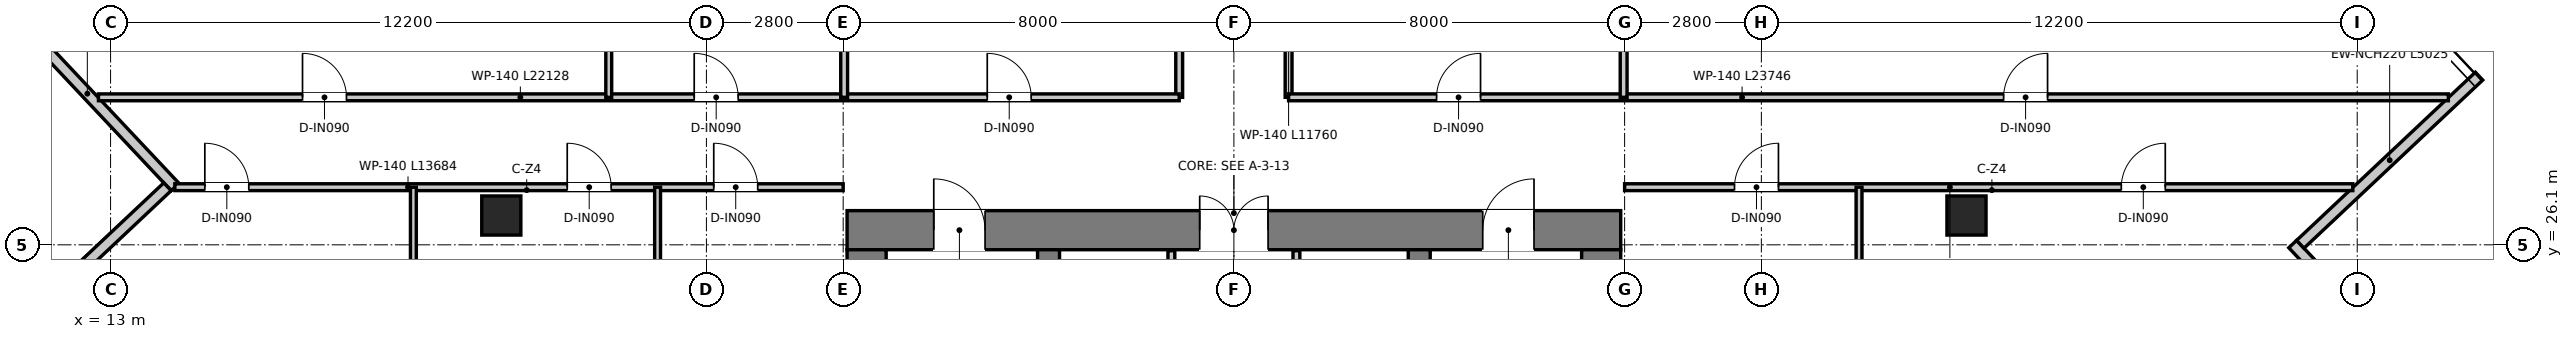
"""IFC4 building model, lengths in metres.
Left out: names, types, materials, properties, quantities, classifications, styles, units other than length and angle.
Written with IfcOpenShell. Run it as: python <this file> out.ifc"""

import sys

from ifc_helpers import new_model, si_unit, direction, frame, frame_2d, origin, origin_2d, place, context, subcontext, project, spatial, rectangle, extrude, source, transform, mapped, element, fill, save


model = new_model("IFC4")
c1 = context("Model", 3, precision=1e-05, world=origin(), true_north=direction((0.0, 1.0)))
c2 = subcontext(c1, "Body", "Model", "MODEL_VIEW")
j1 = project(units=[si_unit("LENGTHUNIT", "METRE"), si_unit("PLANEANGLEUNIT", "RADIAN")], contexts=[c1])
p1 = place(None, origin())
s1 = spatial("IfcSite", under=j1, at=p1, CompositionType="ELEMENT")
p2 = place(p1, origin())
s2 = spatial("IfcBuilding", under=s1, at=p2, CompositionType="ELEMENT")
p3 = place(p2, frame((0.0, 0.0, 242.85)))
s3 = spatial("IfcBuildingStorey", under=s2, at=p3, CompositionType="ELEMENT", Elevation=242.85)
p4 = place(p3, frame((28.08, 26.4, 0.0), z_axis=(0.0, 0.0, 1.0), x_axis=(1.0, 0.0, 0.0)))
e1 = element("IfcWall", 1, at=p4, inside=s3, PredefinedType="SHEAR", context=c2, shape_type="SweptSolid", body=[
    extrude(rectangle(XDim=15.84, YDim=0.8, at=frame_2d((7.92, 0.0))), origin(), (0.0, 0.0, 1.0), 3.95),
])
p5 = place(p4, frame((7.22, 0.0, 0.0)))
e2 = element("IfcOpeningElement", 2, at=p5, cuts=e1, PredefinedType="OPENING", context=c2, shape_type="SweptSolid", body=[
    extrude(rectangle(XDim=1.4, YDim=2.2, at=frame_2d((0.7, 1.1))), frame((0.0, 0.41, 0.0), z_axis=(0.0, -1.0, 0.0), x_axis=(1.0, 0.0, 0.0)), (0.0, 0.0, 1.0), 0.82),
])
p6 = place(p4, frame((1.775, 0.0, 0.0)))
e3 = element("IfcOpeningElement", 3, at=p6, cuts=e1, PredefinedType="OPENING", context=c2, shape_type="SweptSolid", body=[
    extrude(rectangle(XDim=1.05, YDim=2.1, at=frame_2d((0.525, 1.05))), frame((0.0, 0.41, 0.0), z_axis=(0.0, -1.0, 0.0), x_axis=(1.0, 0.0, 0.0)), (0.0, 0.0, 1.0), 0.82),
])
p7 = place(p4, frame((13.015, 0.0, 0.0)))
e4 = element("IfcOpeningElement", 4, at=p7, cuts=e1, PredefinedType="OPENING", context=c2, shape_type="SweptSolid", body=[
    extrude(rectangle(XDim=1.05, YDim=2.1, at=frame_2d((0.525, 1.05))), frame((0.0, 0.41, 0.0), z_axis=(0.0, -1.0, 0.0), x_axis=(1.0, 0.0, 0.0)), (0.0, 0.0, 1.0), 0.82),
])
for number, where, z_axis, x_axis in (
    (5, (28.48, 11.3, 0.0), (0.0, 0.0, 1.0), (0.0, 1.0, 0.0)),
    (6, (43.52, 11.3, 0.0), (0.0, 0.0, 1.0), (0.0, 1.0, 0.0)),
):
    element("IfcWall", number, at=place(p3, frame(where, z_axis=z_axis, x_axis=x_axis)), inside=s3, PredefinedType="SHEAR", context=c2, shape_type="SweptSolid", body=[
        extrude(rectangle(XDim=14.7, YDim=0.8, at=frame_2d((7.35, 0.0))), origin(), (0.0, 0.0, 1.0), 3.95),
    ])
p8 = place(p3, frame((32.205, 13.22, 0.0), z_axis=(0.0, 0.0, 1.0), x_axis=(0.0, 1.0, 0.0)))
e7 = element("IfcWall", 7, at=p8, inside=s3, PredefinedType="SHEAR", context=c2, shape_type="SweptSolid", body=[
    extrude(rectangle(XDim=12.78, YDim=0.45, at=frame_2d((6.39, 0.0))), origin(), (0.0, 0.0, 1.0), 3.95),
])
p9 = place(p8, frame((10.58, 0.0, 0.0)))
e8 = element("IfcOpeningElement", 8, at=p9, cuts=e7, PredefinedType="OPENING", context=c2, shape_type="SweptSolid", body=[
    extrude(rectangle(XDim=1.1, YDim=2.15, at=frame_2d((0.55, 1.075))), frame((0.0, 0.235, 0.0), z_axis=(0.0, -1.0, 0.0), x_axis=(1.0, 0.0, 0.0)), (0.0, 0.0, 1.0), 0.47),
])
p10 = place(p3, frame((39.795, 13.22, 0.0), z_axis=(0.0, 0.0, 1.0), x_axis=(0.0, 1.0, 0.0)))
e9 = element("IfcWall", 9, at=p10, inside=s3, PredefinedType="SHEAR", context=c2, shape_type="SweptSolid", body=[
    extrude(rectangle(XDim=12.78, YDim=0.45, at=frame_2d((6.39, 0.0))), origin(), (0.0, 0.0, 1.0), 3.95),
])
p11 = place(p10, frame((10.58, 0.0, 0.0)))
e10 = element("IfcOpeningElement", 10, at=p11, cuts=e9, PredefinedType="OPENING", context=c2, shape_type="SweptSolid", body=[
    extrude(rectangle(XDim=1.1, YDim=2.15, at=frame_2d((0.55, 1.075))), frame((0.0, 0.235, 0.0), z_axis=(0.0, -1.0, 0.0), x_axis=(1.0, 0.0, 0.0)), (0.0, 0.0, 1.0), 0.47),
])
m1 = source(origin(), c2, "Body", "SweptSolid", [
    extrude(rectangle(XDim=0.8, YDim=0.8, at=origin_2d()), origin(), (0.0, 0.0, 1.0), 3.95),
])
for number, where, z_axis, x_axis in (
    (11, (21.0, 26.7, 0.0), (0.0, 0.0, 1.0), (1.0, 0.0, 0.0)),
    (12, (51.0, 26.7, 0.0), (0.0, 0.0, 1.0), (1.0, 0.0, 0.0)),
):
    element("IfcColumn", number, at=place(p3, frame(where, z_axis=z_axis, x_axis=x_axis)), inside=s3, PredefinedType="COLUMN", context=c2, shape_type="MappedRepresentation", body=[
        mapped(m1, transform((0.0, 0.0, 0.0), x_axis=(1.0, 0.0, 0.0), y_axis=(0.0, 1.0, 0.0), z_axis=(0.0, 0.0, 1.0), scale=1.0)),
    ])
p12 = place(p3, frame((10.727, 31.105, 0.0), z_axis=(0.0, 0.0, 1.0), x_axis=(0.685178828418, -0.728374884992, 0.0)))
e13 = element("IfcWall", 13, at=p12, inside=s3, PredefinedType="ELEMENTEDWALL", context=c2, shape_type="SweptSolid", body=[
    extrude(rectangle(XDim=5.245, YDim=0.22, at=frame_2d((2.623, 0.0))), origin(), (0.0, 0.0, 1.0), 3.67),
])
p13 = place(p3, frame((14.165, 27.289, 0.0), z_axis=(0.0, 0.0, 1.0), x_axis=(-0.728372554527, -0.685181305796, 0.0)))
e14 = element("IfcWall", 14, at=p13, inside=s3, PredefinedType="ELEMENTEDWALL", context=c2, shape_type="SweptSolid", body=[
    extrude(rectangle(XDim=5.025, YDim=0.22, at=frame_2d((2.513, 0.0))), origin(), (0.0, 0.0, 1.0), 3.67),
])
p14 = place(p3, frame((61.273, 22.295, 0.0), z_axis=(0.0, 0.0, 1.0), x_axis=(-0.685178828418, 0.728374884992, 0.0)))
e15 = element("IfcWall", 15, at=p14, inside=s3, PredefinedType="ELEMENTEDWALL", context=c2, shape_type="SweptSolid", body=[
    extrude(rectangle(XDim=5.245, YDim=0.22, at=frame_2d((2.623, 0.0))), origin(), (0.0, 0.0, 1.0), 3.67),
])
p15 = place(p3, frame((57.835, 26.111, 0.0), z_axis=(0.0, 0.0, 1.0), x_axis=(0.728372554527, 0.685181305796, 0.0)))
e16 = element("IfcWall", 16, at=p15, inside=s3, PredefinedType="ELEMENTEDWALL", context=c2, shape_type="SweptSolid", body=[
    extrude(rectangle(XDim=5.025, YDim=0.22, at=frame_2d((2.513, 0.0))), origin(), (0.0, 0.0, 1.0), 3.67),
])
p16 = place(p3, frame((34.72, 20.2, 0.0), z_axis=(0.0, 0.0, 1.0), x_axis=(0.0, 1.0, 0.0)))
e17 = element("IfcWall", 17, at=p16, inside=s3, PredefinedType="PARTITIONING", context=c2, shape_type="SweptSolid", body=[
    extrude(rectangle(XDim=5.78, YDim=0.14, at=frame_2d((2.89, 0.0))), origin(), (0.0, 0.0, 1.0), 2.82),
])
p17 = place(p16, frame((1.05, 0.0, 0.0)))
e18 = element("IfcOpeningElement", 18, at=p17, cuts=e17, PredefinedType="OPENING", context=c2, shape_type="SweptSolid", body=[
    extrude(rectangle(XDim=0.9, YDim=2.1, at=frame_2d((0.45, 1.05))), frame((0.0, 0.08, 0.0), z_axis=(0.0, -1.0, 0.0), x_axis=(1.0, 0.0, 0.0)), (0.0, 0.0, 1.0), 0.16),
])
p18 = place(p3, frame((37.28, 20.2, 0.0), z_axis=(0.0, 0.0, 1.0), x_axis=(0.0, 1.0, 0.0)))
e19 = element("IfcWall", 19, at=p18, inside=s3, PredefinedType="PARTITIONING", context=c2, shape_type="SweptSolid", body=[
    extrude(rectangle(XDim=5.78, YDim=0.14, at=frame_2d((2.89, 0.0))), origin(), (0.0, 0.0, 1.0), 2.82),
])
p19 = place(p18, frame((0.95, 0.0, 0.0)))
e20 = element("IfcOpeningElement", 20, at=p19, cuts=e19, PredefinedType="OPENING", context=c2, shape_type="SweptSolid", body=[
    extrude(rectangle(XDim=1.1, YDim=2.15, at=frame_2d((0.55, 1.075))), frame((0.0, 0.08, 0.0), z_axis=(0.0, -1.0, 0.0), x_axis=(1.0, 0.0, 0.0)), (0.0, 0.0, 1.0), 0.16),
])
p20 = place(p3, frame((34.88, 29.12, 0.0), z_axis=(0.0, 0.0, 1.0), x_axis=(0.0, 1.0, 0.0)))
e21 = element("IfcWall", 21, at=p20, inside=s3, PredefinedType="PARTITIONING", context=c2, shape_type="SweptSolid", body=[
    extrude(rectangle(XDim=11.76, YDim=0.14, at=frame_2d((5.88, 0.0))), origin(), (0.0, 0.0, 1.0), 3.03),
])
p21 = place(p20, frame((3.205, 0.0, 0.0)))
e22 = element("IfcOpeningElement", 22, at=p21, cuts=e21, PredefinedType="OPENING", context=c2, shape_type="SweptSolid", body=[
    extrude(rectangle(XDim=0.95, YDim=2.1, at=frame_2d((0.475, 1.05))), frame((0.0, 0.08, 0.0), z_axis=(0.0, -1.0, 0.0), x_axis=(1.0, 0.0, 0.0)), (0.0, 0.0, 1.0), 0.16),
])
p22 = place(p20, frame((8.02, 0.0, 0.0)))
e23 = element("IfcOpeningElement", 23, at=p22, cuts=e21, PredefinedType="OPENING", context=c2, shape_type="SweptSolid", body=[
    extrude(rectangle(XDim=0.9, YDim=2.1, at=frame_2d((0.45, 1.05))), frame((0.0, 0.08, 0.0), z_axis=(0.0, -1.0, 0.0), x_axis=(1.0, 0.0, 0.0)), (0.0, 0.0, 1.0), 0.16),
])
p23 = place(p3, frame((37.12, 29.12, 0.0), z_axis=(0.0, 0.0, 1.0), x_axis=(0.0, 1.0, 0.0)))
e24 = element("IfcWall", 24, at=p23, inside=s3, PredefinedType="PARTITIONING", context=c2, shape_type="SweptSolid", body=[
    extrude(rectangle(XDim=11.76, YDim=0.14, at=frame_2d((5.88, 0.0))), origin(), (0.0, 0.0, 1.0), 3.03),
])
p24 = place(p23, frame((4.085, 0.0, 0.0)))
e25 = element("IfcOpeningElement", 25, at=p24, cuts=e24, PredefinedType="OPENING", context=c2, shape_type="SweptSolid", body=[
    extrude(rectangle(XDim=0.95, YDim=2.1, at=frame_2d((0.475, 1.05))), frame((0.0, 0.08, 0.0), z_axis=(0.0, -1.0, 0.0), x_axis=(1.0, 0.0, 0.0)), (0.0, 0.0, 1.0), 0.16),
])
p25 = place(p23, frame((6.82, 0.0, 0.0)))
e26 = element("IfcOpeningElement", 26, at=p25, cuts=e24, PredefinedType="OPENING", context=c2, shape_type="SweptSolid", body=[
    extrude(rectangle(XDim=0.9, YDim=2.1, at=frame_2d((0.45, 1.05))), frame((0.0, 0.08, 0.0), z_axis=(0.0, -1.0, 0.0), x_axis=(1.0, 0.0, 0.0)), (0.0, 0.0, 1.0), 0.16),
])
p26 = place(p23, frame((9.83, 0.0, 0.0)))
e27 = element("IfcOpeningElement", 27, at=p26, cuts=e24, PredefinedType="OPENING", context=c2, shape_type="SweptSolid", body=[
    extrude(rectangle(XDim=0.9, YDim=2.1, at=frame_2d((0.45, 1.05))), frame((0.0, 0.08, 0.0), z_axis=(0.0, -1.0, 0.0), x_axis=(1.0, 0.0, 0.0)), (0.0, 0.0, 1.0), 0.16),
])
p27 = place(p3, frame((12.752, 29.12, 0.0), z_axis=(0.0, 0.0, 1.0), x_axis=(1.0, 0.0, 0.0)))
e28 = element("IfcWall", 28, at=p27, inside=s3, PredefinedType="PARTITIONING", context=c2, shape_type="SweptSolid", body=[
    extrude(rectangle(XDim=22.128, YDim=0.14, at=frame_2d((11.064, 0.0))), origin(), (0.0, 0.0, 1.0), 3.03),
])
p28 = place(p27, frame((18.198, 0.0, 0.0)))
e29 = element("IfcOpeningElement", 29, at=p28, cuts=e28, PredefinedType="OPENING", context=c2, shape_type="SweptSolid", body=[
    extrude(rectangle(XDim=0.9, YDim=2.1, at=frame_2d((0.45, 1.05))), frame((0.0, 0.08, 0.0), z_axis=(0.0, -1.0, 0.0), x_axis=(1.0, 0.0, 0.0)), (0.0, 0.0, 1.0), 0.16),
])
p29 = place(p27, frame((4.178, 0.0, 0.0)))
e30 = element("IfcOpeningElement", 30, at=p29, cuts=e28, PredefinedType="OPENING", context=c2, shape_type="SweptSolid", body=[
    extrude(rectangle(XDim=0.9, YDim=2.1, at=frame_2d((0.45, 1.05))), frame((0.0, 0.08, 0.0), z_axis=(0.0, -1.0, 0.0), x_axis=(1.0, 0.0, 0.0)), (0.0, 0.0, 1.0), 0.16),
])
p30 = place(p27, frame((12.198, 0.0, 0.0)))
e31 = element("IfcOpeningElement", 31, at=p30, cuts=e28, PredefinedType="OPENING", context=c2, shape_type="SweptSolid", body=[
    extrude(rectangle(XDim=0.9, YDim=2.1, at=frame_2d((0.45, 1.05))), frame((0.0, 0.08, 0.0), z_axis=(0.0, -1.0, 0.0), x_axis=(1.0, 0.0, 0.0)), (0.0, 0.0, 1.0), 0.16),
])
p31 = place(p3, frame((37.12, 29.12, 0.0), z_axis=(0.0, 0.0, 1.0), x_axis=(1.0, 0.0, 0.0)))
e32 = element("IfcWall", 32, at=p31, inside=s3, PredefinedType="PARTITIONING", context=c2, shape_type="SweptSolid", body=[
    extrude(rectangle(XDim=23.746, YDim=0.14, at=frame_2d((11.873, 0.0))), origin(), (0.0, 0.0, 1.0), 3.03),
])
p32 = place(p31, frame((3.03, 0.0, 0.0)))
e33 = element("IfcOpeningElement", 33, at=p32, cuts=e32, PredefinedType="OPENING", context=c2, shape_type="SweptSolid", body=[
    extrude(rectangle(XDim=0.9, YDim=2.1, at=frame_2d((0.45, 1.05))), frame((0.0, 0.08, 0.0), z_axis=(0.0, -1.0, 0.0), x_axis=(1.0, 0.0, 0.0)), (0.0, 0.0, 1.0), 0.16),
])
p33 = place(p31, frame((14.64, 0.0, 0.0)))
e34 = element("IfcOpeningElement", 34, at=p33, cuts=e32, PredefinedType="OPENING", context=c2, shape_type="SweptSolid", body=[
    extrude(rectangle(XDim=0.9, YDim=2.1, at=frame_2d((0.45, 1.05))), frame((0.0, 0.08, 0.0), z_axis=(0.0, -1.0, 0.0), x_axis=(1.0, 0.0, 0.0)), (0.0, 0.0, 1.0), 0.16),
])
p34 = place(p3, frame((14.316, 27.28, 0.0), z_axis=(0.0, 0.0, 1.0), x_axis=(1.0, 0.0, 0.0)))
e35 = element("IfcWall", 35, at=p34, inside=s3, PredefinedType="PARTITIONING", context=c2, shape_type="SweptSolid", body=[
    extrude(rectangle(XDim=13.684, YDim=0.14, at=frame_2d((6.842, 0.0))), origin(), (0.0, 0.0, 1.0), 3.03),
])
p35 = place(p34, frame((0.614, 0.0, 0.0)))
e36 = element("IfcOpeningElement", 36, at=p35, cuts=e35, PredefinedType="OPENING", context=c2, shape_type="SweptSolid", body=[
    extrude(rectangle(XDim=0.9, YDim=2.1, at=frame_2d((0.45, 1.05))), frame((0.0, 0.08, 0.0), z_axis=(0.0, -1.0, 0.0), x_axis=(1.0, 0.0, 0.0)), (0.0, 0.0, 1.0), 0.16),
])
p36 = place(p34, frame((8.034, 0.0, 0.0)))
e37 = element("IfcOpeningElement", 37, at=p36, cuts=e35, PredefinedType="OPENING", context=c2, shape_type="SweptSolid", body=[
    extrude(rectangle(XDim=0.9, YDim=2.1, at=frame_2d((0.45, 1.05))), frame((0.0, 0.08, 0.0), z_axis=(0.0, -1.0, 0.0), x_axis=(1.0, 0.0, 0.0)), (0.0, 0.0, 1.0), 0.16),
])
p37 = place(p34, frame((11.034, 0.0, 0.0)))
e38 = element("IfcOpeningElement", 38, at=p37, cuts=e35, PredefinedType="OPENING", context=c2, shape_type="SweptSolid", body=[
    extrude(rectangle(XDim=0.9, YDim=2.1, at=frame_2d((0.45, 1.05))), frame((0.0, 0.08, 0.0), z_axis=(0.0, -1.0, 0.0), x_axis=(1.0, 0.0, 0.0)), (0.0, 0.0, 1.0), 0.16),
])
p38 = place(p3, frame((44.0, 27.28, 0.0), z_axis=(0.0, 0.0, 1.0), x_axis=(1.0, 0.0, 0.0)))
e39 = element("IfcWall", 39, at=p38, inside=s3, PredefinedType="PARTITIONING", context=c2, shape_type="SweptSolid", body=[
    extrude(rectangle(XDim=14.91, YDim=0.14, at=frame_2d((7.455, 0.0))), origin(), (0.0, 0.0, 1.0), 3.03),
])
p39 = place(p38, frame((2.25, 0.0, 0.0)))
e40 = element("IfcOpeningElement", 40, at=p39, cuts=e39, PredefinedType="OPENING", context=c2, shape_type="SweptSolid", body=[
    extrude(rectangle(XDim=0.9, YDim=2.1, at=frame_2d((0.45, 1.05))), frame((0.0, 0.08, 0.0), z_axis=(0.0, -1.0, 0.0), x_axis=(1.0, 0.0, 0.0)), (0.0, 0.0, 1.0), 0.16),
])
p40 = place(p38, frame((10.17, 0.0, 0.0)))
e41 = element("IfcOpeningElement", 41, at=p40, cuts=e39, PredefinedType="OPENING", context=c2, shape_type="SweptSolid", body=[
    extrude(rectangle(XDim=0.9, YDim=2.1, at=frame_2d((0.45, 1.05))), frame((0.0, 0.08, 0.0), z_axis=(0.0, -1.0, 0.0), x_axis=(1.0, 0.0, 0.0)), (0.0, 0.0, 1.0), 0.16),
])
for number, where, z_axis, x_axis in (
    (42, (28.02, 29.12, 0.0), (0.0, 0.0, 1.0), (0.0, 1.0, 0.0)),
    (43, (43.98, 29.12, 0.0), (0.0, 0.0, 1.0), (0.0, 1.0, 0.0)),
):
    element("IfcWall", number, at=place(p3, frame(where, z_axis=z_axis, x_axis=x_axis)), inside=s3, PredefinedType="PARTITIONING", context=c2, shape_type="SweptSolid", body=[
        extrude(rectangle(XDim=5.46, YDim=0.14, at=frame_2d((2.73, 0.0))), origin(), (0.0, 0.0, 1.0), 3.37),
    ])
p41 = place(p3, frame((23.2, 29.12, 0.0), z_axis=(0.0, 0.0, 1.0), x_axis=(0.0, 1.0, 0.0)))
e44 = element("IfcWall", 44, at=p41, inside=s3, PredefinedType="PARTITIONING", context=c2, shape_type="SweptSolid", body=[
    extrude(rectangle(XDim=13.56, YDim=0.12, at=frame_2d((6.78, 0.0))), origin(), (0.0, 0.0, 1.0), 3.18),
])
p42 = place(p3, frame((19.2, 16.237, 0.0), z_axis=(0.0, 0.0, 1.0), x_axis=(0.0, 1.0, 0.0)))
e45 = element("IfcWall", 45, at=p42, inside=s3, PredefinedType="PARTITIONING", context=c2, shape_type="SweptSolid", body=[
    extrude(rectangle(XDim=11.043, YDim=0.12, at=frame_2d((5.521, 0.0))), origin(), (0.0, 0.0, 1.0), 3.67),
])
p43 = place(p3, frame((24.2, 12.572, 0.0), z_axis=(0.0, 0.0, 1.0), x_axis=(0.0, 1.0, 0.0)))
e46 = element("IfcWall", 46, at=p43, inside=s3, PredefinedType="PARTITIONING", context=c2, shape_type="SweptSolid", body=[
    extrude(rectangle(XDim=14.708, YDim=0.12, at=frame_2d((7.354, 0.0))), origin(), (0.0, 0.0, 1.0), 3.18),
])
p44 = place(p3, frame((48.8, 10.719, 0.0), z_axis=(0.0, 0.0, 1.0), x_axis=(0.0, 1.0, 0.0)))
e47 = element("IfcWall", 47, at=p44, inside=s3, PredefinedType="PARTITIONING", context=c2, shape_type="SweptSolid", body=[
    extrude(rectangle(XDim=16.561, YDim=0.12, at=frame_2d((8.28, 0.0))), origin(), (0.0, 0.0, 1.0), 3.18),
])
p45 = place(p5, origin())
e48 = element("IfcDoor", 48, at=p45, inside=s3, OperationType="DOUBLE_DOOR_SINGLE_SWING", PredefinedType="DOOR", context=c2, shape_type="SweptSolid", body=[
    extrude(rectangle(XDim=1.4, YDim=2.2, at=frame_2d((0.7, 1.1))), frame((0.0, 0.025, 0.0), z_axis=(0.0, -1.0, 0.0), x_axis=(1.0, 0.0, 0.0)), (0.0, 0.0, 1.0), 0.05),
])
fill(e2, e48)
p46 = place(p6, origin())
e49 = element("IfcDoor", 49, at=p46, inside=s3, OperationType="SINGLE_SWING_LEFT", PredefinedType="DOOR", context=c2, shape_type="SweptSolid", body=[
    extrude(rectangle(XDim=1.05, YDim=2.1, at=frame_2d((0.525, 1.05))), frame((0.0, 0.025, 0.0), z_axis=(0.0, -1.0, 0.0), x_axis=(1.0, 0.0, 0.0)), (0.0, 0.0, 1.0), 0.05),
])
fill(e3, e49)
p47 = place(p7, origin())
e50 = element("IfcDoor", 50, at=p47, inside=s3, OperationType="SINGLE_SWING_RIGHT", PredefinedType="DOOR", context=c2, shape_type="SweptSolid", body=[
    extrude(rectangle(XDim=1.05, YDim=2.1, at=frame_2d((0.525, 1.05))), frame((0.0, 0.025, 0.0), z_axis=(0.0, -1.0, 0.0), x_axis=(1.0, 0.0, 0.0)), (0.0, 0.0, 1.0), 0.05),
])
fill(e4, e50)
p48 = place(p28, origin())
e51 = element("IfcDoor", 51, at=p48, inside=s3, OperationType="SINGLE_SWING_LEFT", PredefinedType="DOOR", context=c2, shape_type="SweptSolid", body=[
    extrude(rectangle(XDim=0.9, YDim=2.1, at=frame_2d((0.45, 1.05))), frame((0.0, 0.025, 0.0), z_axis=(0.0, -1.0, 0.0), x_axis=(1.0, 0.0, 0.0)), (0.0, 0.0, 1.0), 0.05),
])
fill(e29, e51)
p49 = place(p32, origin())
e52 = element("IfcDoor", 52, at=p49, inside=s3, OperationType="SINGLE_SWING_RIGHT", PredefinedType="DOOR", context=c2, shape_type="SweptSolid", body=[
    extrude(rectangle(XDim=0.9, YDim=2.1, at=frame_2d((0.45, 1.05))), frame((0.0, 0.025, 0.0), z_axis=(0.0, -1.0, 0.0), x_axis=(1.0, 0.0, 0.0)), (0.0, 0.0, 1.0), 0.05),
])
fill(e33, e52)
p50 = place(p29, origin())
e53 = element("IfcDoor", 53, at=p50, inside=s3, OperationType="SINGLE_SWING_LEFT", PredefinedType="DOOR", context=c2, shape_type="SweptSolid", body=[
    extrude(rectangle(XDim=0.9, YDim=2.1, at=frame_2d((0.45, 1.05))), frame((0.0, 0.025, 0.0), z_axis=(0.0, -1.0, 0.0), x_axis=(1.0, 0.0, 0.0)), (0.0, 0.0, 1.0), 0.05),
])
fill(e30, e53)
p51 = place(p30, origin())
e54 = element("IfcDoor", 54, at=p51, inside=s3, OperationType="SINGLE_SWING_LEFT", PredefinedType="DOOR", context=c2, shape_type="SweptSolid", body=[
    extrude(rectangle(XDim=0.9, YDim=2.1, at=frame_2d((0.45, 1.05))), frame((0.0, 0.025, 0.0), z_axis=(0.0, -1.0, 0.0), x_axis=(1.0, 0.0, 0.0)), (0.0, 0.0, 1.0), 0.05),
])
fill(e31, e54)
p52 = place(p33, origin())
e55 = element("IfcDoor", 55, at=p52, inside=s3, OperationType="SINGLE_SWING_RIGHT", PredefinedType="DOOR", context=c2, shape_type="SweptSolid", body=[
    extrude(rectangle(XDim=0.9, YDim=2.1, at=frame_2d((0.45, 1.05))), frame((0.0, 0.025, 0.0), z_axis=(0.0, -1.0, 0.0), x_axis=(1.0, 0.0, 0.0)), (0.0, 0.0, 1.0), 0.05),
])
fill(e34, e55)
p53 = place(p35, origin())
e56 = element("IfcDoor", 56, at=p53, inside=s3, OperationType="SINGLE_SWING_LEFT", PredefinedType="DOOR", context=c2, shape_type="SweptSolid", body=[
    extrude(rectangle(XDim=0.9, YDim=2.1, at=frame_2d((0.45, 1.05))), frame((0.0, 0.025, 0.0), z_axis=(0.0, -1.0, 0.0), x_axis=(1.0, 0.0, 0.0)), (0.0, 0.0, 1.0), 0.05),
])
fill(e36, e56)
p54 = place(p36, origin())
e57 = element("IfcDoor", 57, at=p54, inside=s3, OperationType="SINGLE_SWING_LEFT", PredefinedType="DOOR", context=c2, shape_type="SweptSolid", body=[
    extrude(rectangle(XDim=0.9, YDim=2.1, at=frame_2d((0.45, 1.05))), frame((0.0, 0.025, 0.0), z_axis=(0.0, -1.0, 0.0), x_axis=(1.0, 0.0, 0.0)), (0.0, 0.0, 1.0), 0.05),
])
fill(e37, e57)
p55 = place(p37, origin())
e58 = element("IfcDoor", 58, at=p55, inside=s3, OperationType="SINGLE_SWING_LEFT", PredefinedType="DOOR", context=c2, shape_type="SweptSolid", body=[
    extrude(rectangle(XDim=0.9, YDim=2.1, at=frame_2d((0.45, 1.05))), frame((0.0, 0.025, 0.0), z_axis=(0.0, -1.0, 0.0), x_axis=(1.0, 0.0, 0.0)), (0.0, 0.0, 1.0), 0.05),
])
fill(e38, e58)
p56 = place(p39, origin())
e59 = element("IfcDoor", 59, at=p56, inside=s3, OperationType="SINGLE_SWING_RIGHT", PredefinedType="DOOR", context=c2, shape_type="SweptSolid", body=[
    extrude(rectangle(XDim=0.9, YDim=2.1, at=frame_2d((0.45, 1.05))), frame((0.0, 0.025, 0.0), z_axis=(0.0, -1.0, 0.0), x_axis=(1.0, 0.0, 0.0)), (0.0, 0.0, 1.0), 0.05),
])
fill(e40, e59)
p57 = place(p40, origin())
e60 = element("IfcDoor", 60, at=p57, inside=s3, OperationType="SINGLE_SWING_RIGHT", PredefinedType="DOOR", context=c2, shape_type="SweptSolid", body=[
    extrude(rectangle(XDim=0.9, YDim=2.1, at=frame_2d((0.45, 1.05))), frame((0.0, 0.025, 0.0), z_axis=(0.0, -1.0, 0.0), x_axis=(1.0, 0.0, 0.0)), (0.0, 0.0, 1.0), 0.05),
])
fill(e41, e60)
save(model, sys.argv[1])
